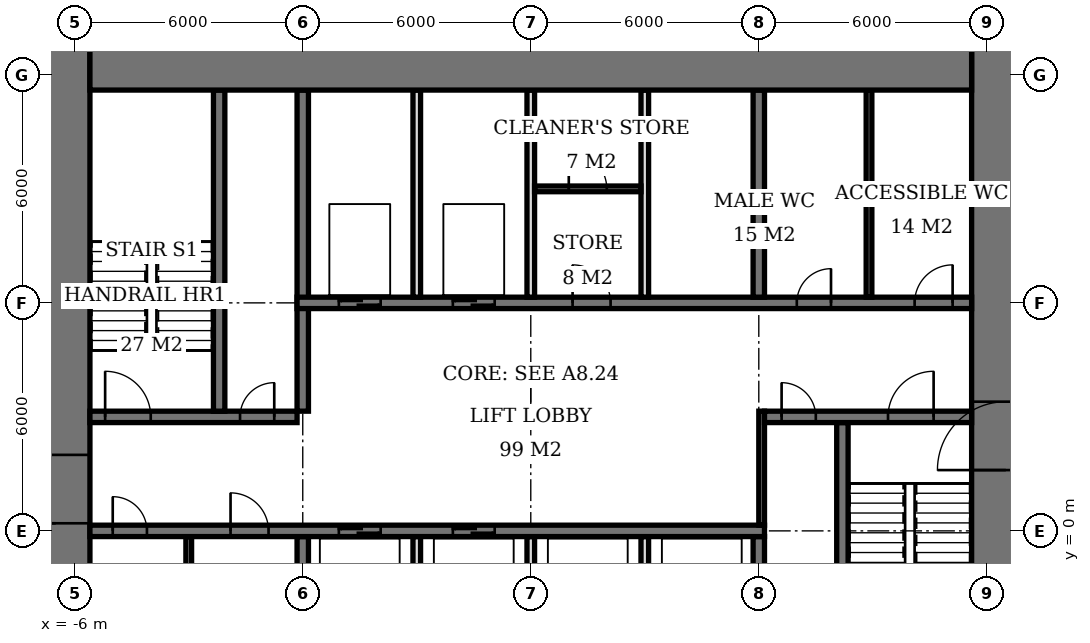
"""IFC4 building model, lengths in metres.
Left out: names, types, materials, properties, quantities, classifications, styles, units other than length and angle.
Written with IfcOpenShell. Run it as: python <this file> out.ifc"""

import sys

from ifc_helpers import new_model, si_unit, direction, frame, frame_2d, origin, place, context, subcontext, project, spatial, rectangle, extrude, element, fill, save


model = new_model("IFC4")
c1 = context("Model", 3, precision=1e-05, world=origin(), true_north=direction((0.0, 1.0)))
c2 = subcontext(c1, "Body", "Model", "MODEL_VIEW")
j1 = project(units=[si_unit("LENGTHUNIT", "METRE"), si_unit("PLANEANGLEUNIT", "RADIAN")], contexts=[c1])
p1 = place(None, origin())
s1 = spatial("IfcSite", under=j1, at=p1, CompositionType="ELEMENT")
p2 = place(p1, origin())
s2 = spatial("IfcBuilding", under=s1, at=p2, CompositionType="ELEMENT")
p3 = place(p2, frame((0.0, 0.0, 132.8)))
s3 = spatial("IfcBuildingStorey", under=s2, at=p3, CompositionType="ELEMENT", Elevation=132.8)
p4 = place(p3, frame((-5.6, 12.6, 0.0), z_axis=(0.0, 0.0, 1.0), x_axis=(1.0, 0.0, 0.0)))
e1 = element("IfcWall", 1, at=p4, inside=s3, PredefinedType="SHEAR", context=c2, shape_type="SweptSolid", body=[
    extrude(rectangle(XDim=23.2, YDim=2.0, at=frame_2d((11.6, 0.0))), origin(), (0.0, 0.0, 1.0), 3.9),
])
p5 = place(p3, frame((-6.5, -7.6, 0.0), z_axis=(0.0, 0.0, 1.0), x_axis=(0.0, 1.0, 0.0)))
e2 = element("IfcWall", 2, at=p5, inside=s3, PredefinedType="SHEAR", context=c2, shape_type="SweptSolid", body=[
    extrude(rectangle(XDim=21.2, YDim=1.8, at=frame_2d((10.6, 0.0))), origin(), (0.0, 0.0, 1.0), 3.9),
])
p6 = place(p5, frame((7.8, 0.0, 0.0)))
e3 = element("IfcOpeningElement", 3, at=p6, cuts=e2, PredefinedType="OPENING", context=c2, shape_type="SweptSolid", body=[
    extrude(rectangle(XDim=1.8, YDim=2.4, at=frame_2d((0.9, 1.2))), frame((0.0, 0.91, 0.0), z_axis=(0.0, -1.0, 0.0), x_axis=(1.0, 0.0, 0.0)), (0.0, 0.0, 1.0), 1.82),
])
p7 = place(p3, frame((18.5, -7.6, 0.0), z_axis=(0.0, 0.0, 1.0), x_axis=(0.0, 1.0, 0.0)))
e4 = element("IfcWall", 4, at=p7, inside=s3, PredefinedType="SHEAR", context=c2, shape_type="SweptSolid", body=[
    extrude(rectangle(XDim=21.2, YDim=1.8, at=frame_2d((10.6, 0.0))), origin(), (0.0, 0.0, 1.0), 3.9),
])
p8 = place(p7, frame((9.2, 0.0, 0.0)))
e5 = element("IfcOpeningElement", 5, at=p8, cuts=e4, PredefinedType="OPENING", context=c2, shape_type="SweptSolid", body=[
    extrude(rectangle(XDim=1.8, YDim=2.4, at=frame_2d((0.9, 1.2))), frame((0.0, 0.91, 0.0), z_axis=(0.0, -1.0, 0.0), x_axis=(1.0, 0.0, 0.0)), (0.0, 0.0, 1.0), 1.82),
])
p9 = place(p3, frame((-5.6, 0.0, 0.0), z_axis=(0.0, 0.0, 1.0), x_axis=(1.0, 0.0, 0.0)))
e6 = element("IfcWall", 6, at=p9, inside=s3, PredefinedType="SHEAR", context=c2, shape_type="SweptSolid", body=[
    extrude(rectangle(XDim=17.75, YDim=0.3, at=frame_2d((8.875, 0.0))), origin(), (0.0, 0.0, 1.0), 3.9),
])
p10 = place(p9, frame((0.6, 0.0, 0.0)))
e7 = element("IfcOpeningElement", 7, at=p10, cuts=e6, PredefinedType="OPENING", context=c2, shape_type="SweptSolid", body=[
    extrude(rectangle(XDim=0.9, YDim=2.1, at=frame_2d((0.45, 1.05))), frame((0.0, 0.16, 0.0), z_axis=(0.0, -1.0, 0.0), x_axis=(1.0, 0.0, 0.0)), (0.0, 0.0, 1.0), 0.32),
])
p11 = place(p9, frame((3.7, 0.0, 0.0)))
e8 = element("IfcOpeningElement", 8, at=p11, cuts=e6, PredefinedType="OPENING", context=c2, shape_type="SweptSolid", body=[
    extrude(rectangle(XDim=1.0, YDim=2.1, at=frame_2d((0.5, 1.05))), frame((0.0, 0.16, 0.0), z_axis=(0.0, -1.0, 0.0), x_axis=(1.0, 0.0, 0.0)), (0.0, 0.0, 1.0), 0.32),
])
p12 = place(p9, frame((6.55, 0.0, 0.0)))
e9 = element("IfcOpeningElement", 9, at=p12, cuts=e6, PredefinedType="OPENING", context=c2, shape_type="SweptSolid", body=[
    extrude(rectangle(XDim=1.1, YDim=2.1, at=frame_2d((0.55, 1.05))), frame((0.0, 0.16, 0.0), z_axis=(0.0, -1.0, 0.0), x_axis=(1.0, 0.0, 0.0)), (0.0, 0.0, 1.0), 0.32),
])
p13 = place(p9, frame((9.55, 0.0, 0.0)))
e10 = element("IfcOpeningElement", 10, at=p13, cuts=e6, PredefinedType="OPENING", context=c2, shape_type="SweptSolid", body=[
    extrude(rectangle(XDim=1.1, YDim=2.1, at=frame_2d((0.55, 1.05))), frame((0.0, 0.16, 0.0), z_axis=(0.0, -1.0, 0.0), x_axis=(1.0, 0.0, 0.0)), (0.0, 0.0, 1.0), 0.32),
])
p14 = place(p3, frame((-5.6, 3.0, 0.0), z_axis=(0.0, 0.0, 1.0), x_axis=(1.0, 0.0, 0.0)))
e11 = element("IfcWall", 11, at=p14, inside=s3, PredefinedType="SHEAR", context=c2, shape_type="SweptSolid", body=[
    extrude(rectangle(XDim=5.45, YDim=0.3, at=frame_2d((2.725, 0.0))), origin(), (0.0, 0.0, 1.0), 3.9),
])
p15 = place(p14, frame((0.4, 0.0, 0.0)))
e12 = element("IfcOpeningElement", 12, at=p15, cuts=e11, PredefinedType="OPENING", context=c2, shape_type="SweptSolid", body=[
    extrude(rectangle(XDim=1.2, YDim=2.1, at=frame_2d((0.6, 1.05))), frame((0.0, 0.16, 0.0), z_axis=(0.0, -1.0, 0.0), x_axis=(1.0, 0.0, 0.0)), (0.0, 0.0, 1.0), 0.32),
])
p16 = place(p14, frame((3.95, 0.0, 0.0)))
e13 = element("IfcOpeningElement", 13, at=p16, cuts=e11, PredefinedType="OPENING", context=c2, shape_type="SweptSolid", body=[
    extrude(rectangle(XDim=0.9, YDim=2.1, at=frame_2d((0.45, 1.05))), frame((0.0, 0.16, 0.0), z_axis=(0.0, -1.0, 0.0), x_axis=(1.0, 0.0, 0.0)), (0.0, 0.0, 1.0), 0.32),
])
p17 = place(p3, frame((12.15, 3.0, 0.0), z_axis=(0.0, 0.0, 1.0), x_axis=(1.0, 0.0, 0.0)))
e14 = element("IfcWall", 14, at=p17, inside=s3, PredefinedType="SHEAR", context=c2, shape_type="SweptSolid", body=[
    extrude(rectangle(XDim=5.45, YDim=0.3, at=frame_2d((2.725, 0.0))), origin(), (0.0, 0.0, 1.0), 3.9),
])
p18 = place(p17, frame((3.25, 0.0, 0.0)))
e15 = element("IfcOpeningElement", 15, at=p18, cuts=e14, PredefinedType="OPENING", context=c2, shape_type="SweptSolid", body=[
    extrude(rectangle(XDim=1.2, YDim=2.1, at=frame_2d((0.6, 1.05))), frame((0.0, 0.16, 0.0), z_axis=(0.0, -1.0, 0.0), x_axis=(1.0, 0.0, 0.0)), (0.0, 0.0, 1.0), 0.32),
])
p19 = place(p17, frame((0.45, 0.0, 0.0)))
e16 = element("IfcOpeningElement", 16, at=p19, cuts=e14, PredefinedType="OPENING", context=c2, shape_type="SweptSolid", body=[
    extrude(rectangle(XDim=0.9, YDim=2.1, at=frame_2d((0.45, 1.05))), frame((0.0, 0.16, 0.0), z_axis=(0.0, -1.0, 0.0), x_axis=(1.0, 0.0, 0.0)), (0.0, 0.0, 1.0), 0.32),
])
p20 = place(p3, frame((-0.15, 6.0, 0.0), z_axis=(0.0, 0.0, 1.0), x_axis=(1.0, 0.0, 0.0)))
e17 = element("IfcWall", 17, at=p20, inside=s3, PredefinedType="SHEAR", context=c2, shape_type="SweptSolid", body=[
    extrude(rectangle(XDim=17.75, YDim=0.3, at=frame_2d((8.875, 0.0))), origin(), (0.0, 0.0, 1.0), 3.9),
])
p21 = place(p20, frame((13.15, 0.0, 0.0)))
e18 = element("IfcOpeningElement", 18, at=p21, cuts=e17, PredefinedType="OPENING", context=c2, shape_type="SweptSolid", body=[
    extrude(rectangle(XDim=0.9, YDim=2.1, at=frame_2d((0.45, 1.05))), frame((0.0, 0.16, 0.0), z_axis=(0.0, -1.0, 0.0), x_axis=(1.0, 0.0, 0.0)), (0.0, 0.0, 1.0), 0.32),
])
p22 = place(p20, frame((16.25, 0.0, 0.0)))
e19 = element("IfcOpeningElement", 19, at=p22, cuts=e17, PredefinedType="OPENING", context=c2, shape_type="SweptSolid", body=[
    extrude(rectangle(XDim=1.0, YDim=2.1, at=frame_2d((0.5, 1.05))), frame((0.0, 0.16, 0.0), z_axis=(0.0, -1.0, 0.0), x_axis=(1.0, 0.0, 0.0)), (0.0, 0.0, 1.0), 0.32),
])
p23 = place(p20, frame((7.25, 0.0, 0.0)))
e20 = element("IfcOpeningElement", 20, at=p23, cuts=e17, PredefinedType="OPENING", context=c2, shape_type="SweptSolid", body=[
    extrude(rectangle(XDim=1.0, YDim=2.1, at=frame_2d((0.5, 1.05))), frame((0.0, 0.16, 0.0), z_axis=(0.0, -1.0, 0.0), x_axis=(1.0, 0.0, 0.0)), (0.0, 0.0, 1.0), 0.32),
])
p24 = place(p20, frame((1.1, 0.0, 0.0)))
e21 = element("IfcOpeningElement", 21, at=p24, cuts=e17, PredefinedType="OPENING", context=c2, shape_type="SweptSolid", body=[
    extrude(rectangle(XDim=1.1, YDim=2.1, at=frame_2d((0.55, 1.05))), frame((0.0, 0.16, 0.0), z_axis=(0.0, -1.0, 0.0), x_axis=(1.0, 0.0, 0.0)), (0.0, 0.0, 1.0), 0.32),
])
p25 = place(p20, frame((4.1, 0.0, 0.0)))
e22 = element("IfcOpeningElement", 22, at=p25, cuts=e17, PredefinedType="OPENING", context=c2, shape_type="SweptSolid", body=[
    extrude(rectangle(XDim=1.1, YDim=2.1, at=frame_2d((0.55, 1.05))), frame((0.0, 0.16, 0.0), z_axis=(0.0, -1.0, 0.0), x_axis=(1.0, 0.0, 0.0)), (0.0, 0.0, 1.0), 0.32),
])
p26 = place(p3, frame((0.0, -5.6, 0.0), z_axis=(0.0, 0.0, 1.0), x_axis=(0.0, 1.0, 0.0)))
e23 = element("IfcWall", 23, at=p26, inside=s3, PredefinedType="SHEAR", context=c2, shape_type="SweptSolid", body=[
    extrude(rectangle(XDim=5.45, YDim=0.3, at=frame_2d((2.725, 0.0))), origin(), (0.0, 0.0, 1.0), 3.9),
])
p27 = place(p3, frame((0.0, 3.15, 0.0), z_axis=(0.0, 0.0, 1.0), x_axis=(0.0, 1.0, 0.0)))
e24 = element("IfcWall", 24, at=p27, inside=s3, PredefinedType="SHEAR", context=c2, shape_type="SweptSolid", body=[
    extrude(rectangle(XDim=8.45, YDim=0.3, at=frame_2d((4.225, 0.0))), origin(), (0.0, 0.0, 1.0), 3.9),
])
for number, where, z_axis, x_axis in (
    (25, (12.0, -5.6, 0.0), (0.0, 0.0, 1.0), (0.0, 1.0, 0.0)),
    (26, (12.0, 6.15, 0.0), (0.0, 0.0, 1.0), (0.0, 1.0, 0.0)),
):
    element("IfcWall", number, at=place(p3, frame(where, z_axis=z_axis, x_axis=x_axis)), inside=s3, PredefinedType="SHEAR", context=c2, shape_type="SweptSolid", body=[
        extrude(rectangle(XDim=5.45, YDim=0.3, at=frame_2d((2.725, 0.0))), origin(), (0.0, 0.0, 1.0), 3.9),
    ])
for number, where, z_axis, x_axis in (
    (27, (-2.2, 3.15, 0.0), (0.0, 0.0, 1.0), (0.0, 1.0, 0.0)),
    (28, (14.2, -5.6, 0.0), (0.0, 0.0, 1.0), (0.0, 1.0, 0.0)),
):
    element("IfcWall", number, at=place(p3, frame(where, z_axis=z_axis, x_axis=x_axis)), inside=s3, PredefinedType="SHEAR", context=c2, shape_type="SweptSolid", body=[
        extrude(rectangle(XDim=8.45, YDim=0.3, at=frame_2d((4.225, 0.0))), origin(), (0.0, 0.0, 1.0), 3.9),
    ])
for number, where, z_axis, x_axis in (
    (29, (3.0, 6.15, 0.0), (0.0, 0.0, 1.0), (0.0, 1.0, 0.0)),
    (30, (6.0, 6.15, 0.0), (0.0, 0.0, 1.0), (0.0, 1.0, 0.0)),
    (31, (9.0, 6.15, 0.0), (0.0, 0.0, 1.0), (0.0, 1.0, 0.0)),
    (32, (3.0, -5.6, 0.0), (0.0, 0.0, 1.0), (0.0, 1.0, 0.0)),
    (33, (6.0, -5.6, 0.0), (0.0, 0.0, 1.0), (0.0, 1.0, 0.0)),
    (34, (9.0, -5.6, 0.0), (0.0, 0.0, 1.0), (0.0, 1.0, 0.0)),
):
    element("IfcWall", number, at=place(p3, frame(where, z_axis=z_axis, x_axis=x_axis)), inside=s3, PredefinedType="SOLIDWALL", context=c2, shape_type="SweptSolid", body=[
        extrude(rectangle(XDim=5.45, YDim=0.2, at=frame_2d((2.725, 0.0))), origin(), (0.0, 0.0, 1.0), 3.9),
    ])
for number, where, z_axis, x_axis in (
    (35, (-3.0, -5.6, 0.0), (0.0, 0.0, 1.0), (0.0, 1.0, 0.0)),
    (36, (14.9, 6.15, 0.0), (0.0, 0.0, 1.0), (0.0, 1.0, 0.0)),
):
    element("IfcWall", number, at=place(p3, frame(where, z_axis=z_axis, x_axis=x_axis)), inside=s3, PredefinedType="PLUMBINGWALL", context=c2, shape_type="SweptSolid", body=[
        extrude(rectangle(XDim=5.45, YDim=0.15, at=frame_2d((2.725, 0.0))), origin(), (0.0, 0.0, 1.0), 3.65),
    ])
p28 = place(p3, frame((6.1, 9.0, 0.0), z_axis=(0.0, 0.0, 1.0), x_axis=(1.0, 0.0, 0.0)))
e37 = element("IfcWall", 37, at=p28, inside=s3, PredefinedType="PARTITIONING", context=c2, shape_type="SweptSolid", body=[
    extrude(rectangle(XDim=2.8, YDim=0.15, at=frame_2d((1.4, 0.0))), origin(), (0.0, 0.0, 1.0), 3.65),
])
p29 = place(p28, frame((0.9, 0.0, 0.0)))
e38 = element("IfcOpeningElement", 38, at=p29, cuts=e37, PredefinedType="OPENING", context=c2, shape_type="SweptSolid", body=[
    extrude(rectangle(XDim=1.0, YDim=2.1, at=frame_2d((0.5, 1.05))), frame((0.0, 0.085, 0.0), z_axis=(0.0, -1.0, 0.0), x_axis=(1.0, 0.0, 0.0)), (0.0, 0.0, 1.0), 0.17),
])
p30 = place(p3, frame((12.075, 0.15, 0.0), z_axis=(0.0, 0.0, 1.0), x_axis=(0.0, 1.0, 0.0)))
e39 = element("IfcWall", 39, at=p30, inside=s3, PredefinedType="PARTITIONING", context=c2, shape_type="SweptSolid", body=[
    extrude(rectangle(XDim=3.0, YDim=0.15, at=frame_2d((1.5, 0.0))), origin(), (0.0, 0.0, 1.0), 3.65),
])
p31 = place(p6, origin())
e40 = element("IfcDoor", 40, at=p31, inside=s3, OperationType="DOUBLE_DOOR_SINGLE_SWING", PredefinedType="DOOR", context=c2, shape_type="SweptSolid", body=[
    extrude(rectangle(XDim=1.8, YDim=2.4, at=frame_2d((0.9, 1.2))), frame((0.0, 0.025, 0.0), z_axis=(0.0, -1.0, 0.0), x_axis=(1.0, 0.0, 0.0)), (0.0, 0.0, 1.0), 0.05),
])
fill(e3, e40)
p32 = place(p8, origin())
e41 = element("IfcDoor", 41, at=p32, inside=s3, OperationType="DOUBLE_DOOR_SINGLE_SWING", PredefinedType="DOOR", context=c2, shape_type="SweptSolid", body=[
    extrude(rectangle(XDim=1.8, YDim=2.4, at=frame_2d((0.9, 1.2))), frame((0.0, 0.025, 0.0), z_axis=(0.0, -1.0, 0.0), x_axis=(1.0, 0.0, 0.0)), (0.0, 0.0, 1.0), 0.05),
])
fill(e5, e41)
p33 = place(p15, origin())
e42 = element("IfcDoor", 42, at=p33, inside=s3, OperationType="SINGLE_SWING_LEFT", PredefinedType="DOOR", context=c2, shape_type="SweptSolid", body=[
    extrude(rectangle(XDim=1.2, YDim=2.1, at=frame_2d((0.6, 1.05))), frame((0.0, 0.025, 0.0), z_axis=(0.0, -1.0, 0.0), x_axis=(1.0, 0.0, 0.0)), (0.0, 0.0, 1.0), 0.05),
])
fill(e12, e42)
p34 = place(p16, origin())
e43 = element("IfcDoor", 43, at=p34, inside=s3, OperationType="SINGLE_SWING_RIGHT", PredefinedType="DOOR", context=c2, shape_type="SweptSolid", body=[
    extrude(rectangle(XDim=0.9, YDim=2.1, at=frame_2d((0.45, 1.05))), frame((0.0, 0.025, 0.0), z_axis=(0.0, -1.0, 0.0), x_axis=(1.0, 0.0, 0.0)), (0.0, 0.0, 1.0), 0.05),
])
fill(e13, e43)
p35 = place(p18, origin())
e44 = element("IfcDoor", 44, at=p35, inside=s3, OperationType="SINGLE_SWING_RIGHT", PredefinedType="DOOR", context=c2, shape_type="SweptSolid", body=[
    extrude(rectangle(XDim=1.2, YDim=2.1, at=frame_2d((0.6, 1.05))), frame((0.0, 0.025, 0.0), z_axis=(0.0, -1.0, 0.0), x_axis=(1.0, 0.0, 0.0)), (0.0, 0.0, 1.0), 0.05),
])
fill(e15, e44)
p36 = place(p19, origin())
e45 = element("IfcDoor", 45, at=p36, inside=s3, OperationType="SINGLE_SWING_LEFT", PredefinedType="DOOR", context=c2, shape_type="SweptSolid", body=[
    extrude(rectangle(XDim=0.9, YDim=2.1, at=frame_2d((0.45, 1.05))), frame((0.0, 0.025, 0.0), z_axis=(0.0, -1.0, 0.0), x_axis=(1.0, 0.0, 0.0)), (0.0, 0.0, 1.0), 0.05),
])
fill(e16, e45)
p37 = place(p10, origin())
e46 = element("IfcDoor", 46, at=p37, inside=s3, OperationType="SINGLE_SWING_LEFT", PredefinedType="DOOR", context=c2, shape_type="SweptSolid", body=[
    extrude(rectangle(XDim=0.9, YDim=2.1, at=frame_2d((0.45, 1.05))), frame((0.0, 0.025, 0.0), z_axis=(0.0, -1.0, 0.0), x_axis=(1.0, 0.0, 0.0)), (0.0, 0.0, 1.0), 0.05),
])
fill(e7, e46)
p38 = place(p11, origin())
e47 = element("IfcDoor", 47, at=p38, inside=s3, OperationType="SINGLE_SWING_LEFT", PredefinedType="DOOR", context=c2, shape_type="SweptSolid", body=[
    extrude(rectangle(XDim=1.0, YDim=2.1, at=frame_2d((0.5, 1.05))), frame((0.0, 0.025, 0.0), z_axis=(0.0, -1.0, 0.0), x_axis=(1.0, 0.0, 0.0)), (0.0, 0.0, 1.0), 0.05),
])
fill(e8, e47)
p39 = place(p21, origin())
e48 = element("IfcDoor", 48, at=p39, inside=s3, OperationType="SINGLE_SWING_RIGHT", PredefinedType="DOOR", context=c2, shape_type="SweptSolid", body=[
    extrude(rectangle(XDim=0.9, YDim=2.1, at=frame_2d((0.45, 1.05))), frame((0.0, 0.025, 0.0), z_axis=(0.0, -1.0, 0.0), x_axis=(1.0, 0.0, 0.0)), (0.0, 0.0, 1.0), 0.05),
])
fill(e18, e48)
p40 = place(p22, origin())
e49 = element("IfcDoor", 49, at=p40, inside=s3, OperationType="SINGLE_SWING_RIGHT", PredefinedType="DOOR", context=c2, shape_type="SweptSolid", body=[
    extrude(rectangle(XDim=1.0, YDim=2.1, at=frame_2d((0.5, 1.05))), frame((0.0, 0.025, 0.0), z_axis=(0.0, -1.0, 0.0), x_axis=(1.0, 0.0, 0.0)), (0.0, 0.0, 1.0), 0.05),
])
fill(e19, e49)
p41 = place(p29, origin())
e50 = element("IfcDoor", 50, at=p41, inside=s3, OperationType="SINGLE_SWING_LEFT", PredefinedType="DOOR", context=c2, shape_type="SweptSolid", body=[
    extrude(rectangle(XDim=1.0, YDim=2.1, at=frame_2d((0.5, 1.05))), frame((0.0, 0.025, 0.0), z_axis=(0.0, -1.0, 0.0), x_axis=(1.0, 0.0, 0.0)), (0.0, 0.0, 1.0), 0.05),
])
fill(e38, e50)
p42 = place(p23, origin())
e51 = element("IfcDoor", 51, at=p42, inside=s3, OperationType="SINGLE_SWING_LEFT", PredefinedType="DOOR", context=c2, shape_type="SweptSolid", body=[
    extrude(rectangle(XDim=1.0, YDim=2.1, at=frame_2d((0.5, 1.05))), frame((0.0, 0.025, 0.0), z_axis=(0.0, -1.0, 0.0), x_axis=(1.0, 0.0, 0.0)), (0.0, 0.0, 1.0), 0.05),
])
fill(e20, e51)
p43 = place(p24, origin())
e52 = element("IfcDoor", 52, at=p43, inside=s3, OperationType="DOUBLE_DOOR_SLIDING", PredefinedType="USERDEFINED", context=c2, shape_type="SweptSolid", body=[
    extrude(rectangle(XDim=1.1, YDim=2.1, at=frame_2d((0.55, 1.05))), frame((0.0, 0.025, 0.0), z_axis=(0.0, -1.0, 0.0), x_axis=(1.0, 0.0, 0.0)), (0.0, 0.0, 1.0), 0.05),
])
fill(e21, e52)
p44 = place(p25, origin())
e53 = element("IfcDoor", 53, at=p44, inside=s3, OperationType="DOUBLE_DOOR_SLIDING", PredefinedType="USERDEFINED", context=c2, shape_type="SweptSolid", body=[
    extrude(rectangle(XDim=1.1, YDim=2.1, at=frame_2d((0.55, 1.05))), frame((0.0, 0.025, 0.0), z_axis=(0.0, -1.0, 0.0), x_axis=(1.0, 0.0, 0.0)), (0.0, 0.0, 1.0), 0.05),
])
fill(e22, e53)
p45 = place(p12, origin())
e54 = element("IfcDoor", 54, at=p45, inside=s3, OperationType="DOUBLE_DOOR_SLIDING", PredefinedType="USERDEFINED", context=c2, shape_type="SweptSolid", body=[
    extrude(rectangle(XDim=1.1, YDim=2.1, at=frame_2d((0.55, 1.05))), frame((0.0, 0.025, 0.0), z_axis=(0.0, -1.0, 0.0), x_axis=(1.0, 0.0, 0.0)), (0.0, 0.0, 1.0), 0.05),
])
fill(e9, e54)
p46 = place(p13, origin())
e55 = element("IfcDoor", 55, at=p46, inside=s3, OperationType="DOUBLE_DOOR_SLIDING", PredefinedType="USERDEFINED", context=c2, shape_type="SweptSolid", body=[
    extrude(rectangle(XDim=1.1, YDim=2.1, at=frame_2d((0.55, 1.05))), frame((0.0, 0.025, 0.0), z_axis=(0.0, -1.0, 0.0), x_axis=(1.0, 0.0, 0.0)), (0.0, 0.0, 1.0), 0.05),
])
fill(e10, e55)
save(model, sys.argv[1])
